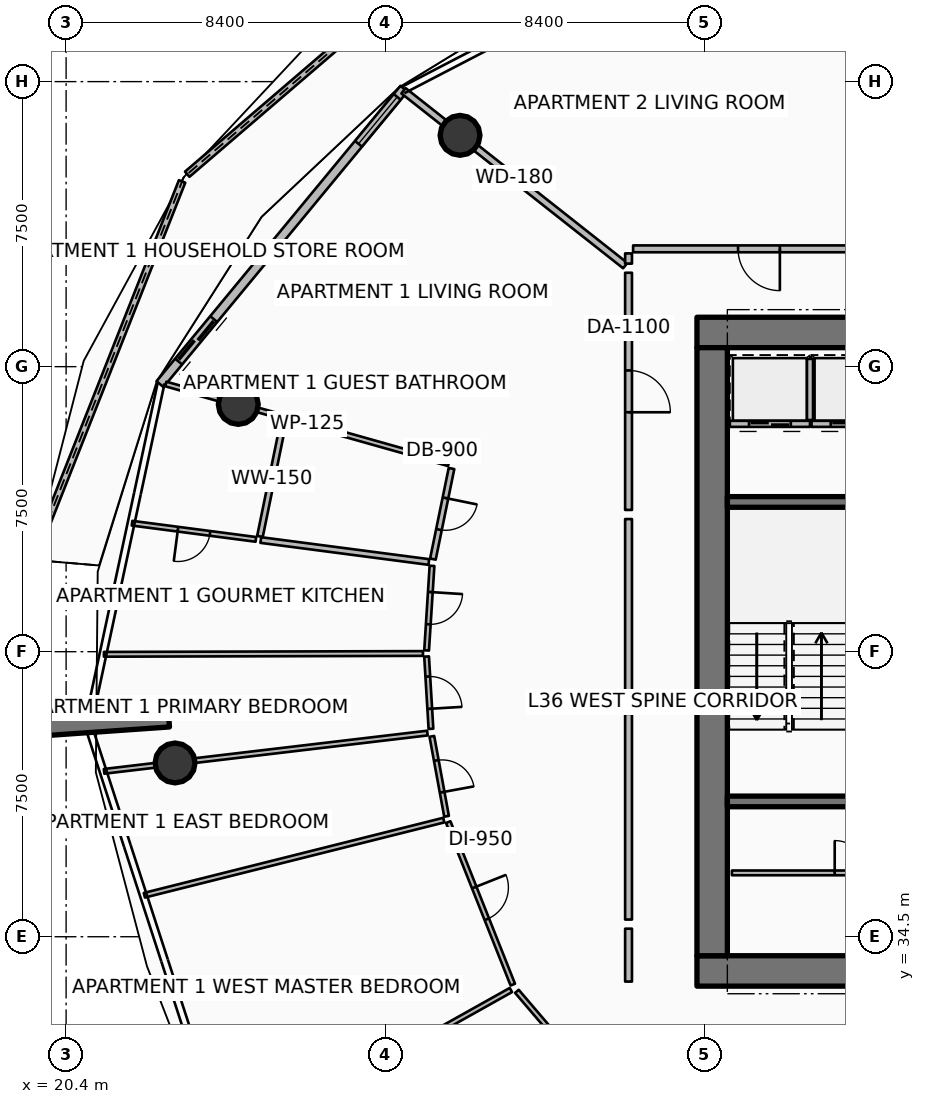
"""IFC4 building model, lengths in metres.
Left out: names, types, materials, properties, quantities, classifications, styles, units other than length and angle.
Written with IfcOpenShell. Run it as: python <this file> out.ifc"""

import sys

from ifc_helpers import new_model, si_unit, direction, frame, frame_2d, origin, origin_2d, place, context, subcontext, project, spatial, polyline, rectangle, circle, outline, extrude, element, fill, save


model = new_model("IFC4")
c1 = context("Model", 3, precision=1e-05, world=origin(), true_north=direction((0.0, 1.0)))
c2 = subcontext(c1, "Body", "Model", "MODEL_VIEW")
j1 = project(units=[si_unit("LENGTHUNIT", "METRE"), si_unit("PLANEANGLEUNIT", "RADIAN")], contexts=[c1])
p1 = place(None, origin())
s1 = spatial("IfcSite", under=j1, at=p1, CompositionType="ELEMENT")
p2 = place(p1, origin())
s2 = spatial("IfcBuilding", under=s1, at=p2, CompositionType="ELEMENT")
p3 = place(p2, frame((0.0, 0.0, 146.55)))
s3 = spatial("IfcBuildingStorey", under=s2, at=p3, CompositionType="ELEMENT", Elevation=146.55)
for number, where, z_axis, x_axis in (
    (1, (37.0, 33.6, 0.0), (0.0, 0.0, 1.0), (1.0, 0.0, 0.0)),
    (2, (37.0, 50.4, 0.0), (0.0, 0.0, 1.0), (1.0, 0.0, 0.0)),
):
    element("IfcWall", number, at=place(p3, frame(where, z_axis=z_axis, x_axis=x_axis)), inside=s3, PredefinedType="SHEAR", context=c2, shape_type="SweptSolid", body=[
        extrude(rectangle(XDim=9.9, YDim=0.8, at=frame_2d((4.95, 0.0))), origin(), (0.0, 0.0, 1.0), 3.75),
    ])
p4 = place(p3, frame((37.4, 34.0, 0.0), z_axis=(0.0, 0.0, 1.0), x_axis=(0.0, 1.0, 0.0)))
e3 = element("IfcWall", 3, at=p4, inside=s3, PredefinedType="SHEAR", context=c2, shape_type="SweptSolid", body=[
    extrude(rectangle(XDim=16.0, YDim=0.8, at=frame_2d((8.0, 0.0))), origin(), (0.0, 0.0, 1.0), 3.75),
])
for number, where, z_axis, x_axis in (
    (4, (37.8, 38.06, 0.0), (0.0, 0.0, 1.0), (1.0, 0.0, 0.0)),
    (5, (37.8, 45.94, 0.0), (0.0, 0.0, 1.0), (1.0, 0.0, 0.0)),
):
    element("IfcWall", number, at=place(p3, frame(where, z_axis=z_axis, x_axis=x_axis)), inside=s3, PredefinedType="SHEAR", context=c2, shape_type="SweptSolid", body=[
        extrude(rectangle(XDim=3.5, YDim=0.28, at=frame_2d((1.75, 0.0))), origin(), (0.0, 0.0, 1.0), 3.75),
    ])
p5 = place(p3, frame((23.103, 40.259, 0.0), z_axis=(0.0, 0.0, 1.0), x_axis=(-0.997564163539, -0.069754853754, 0.0)))
e6 = element("IfcWall", 6, at=p5, inside=s3, PredefinedType="SOLIDWALL", context=c2, shape_type="SweptSolid", body=[
    extrude(rectangle(XDim=3.5, YDim=0.48, at=frame_2d((1.75, 0.0))), origin(), (0.0, 0.0, 1.0), 3.75),
])
for number, where, z_axis, x_axis in (
    (7, (30.766, 55.586, 0.0), (0.0, 0.0, 1.0), (1.0, 0.0, 0.0)),
    (8, (24.93, 48.506, 0.0), (0.0, 0.0, 1.0), (1.0, 0.0, 0.0)),
    (9, (23.267, 39.073, 0.0), (0.0, 0.0, 1.0), (1.0, 0.0, 0.0)),
):
    element("IfcColumn", number, at=place(p3, frame(where, z_axis=z_axis, x_axis=x_axis)), inside=s3, PredefinedType="COLUMN", context=c2, shape_type="SweptSolid", body=[
        extrude(circle(Radius=0.525, at=origin_2d()), origin(), (0.0, 0.0, 1.0), 3.5),
    ])
p6 = place(p3, frame((31.366, 61.237, 0.0), z_axis=(0.0, 0.0, 1.0), x_axis=(-0.758999279374, -0.651091463551, 0.0)))
e10 = element("IfcWall", 10, at=p6, inside=s3, PredefinedType="PARAPET", context=c2, shape_type="SweptSolid", body=[
    extrude(outline(polyline([(0.0, 0.0), (10.249, 0.0), (10.249, 1.632), (5.125, 1.798), (0.0, 1.86), (0.0, 0.0)])), frame((0.0, 0.09, 0.0), z_axis=(0.0, -1.0, 0.0), x_axis=(1.0, 0.0, 0.0)), (0.0, 0.0, 1.0), 0.18),
])
p7 = place(p3, frame((23.452, 54.374, 0.0), z_axis=(0.0, 0.0, 1.0), x_axis=(-0.367668520181, -0.929956912587, 0.0)))
e11 = element("IfcWall", 11, at=p7, inside=s3, PredefinedType="PARAPET", context=c2, shape_type="SweptSolid", body=[
    extrude(outline(polyline([(0.0, 0.0), (10.707, 0.0), (10.707, 1.233), (5.354, 1.418), (0.0, 1.632), (0.0, 0.0)])), frame((0.0, 0.09, 0.0), z_axis=(0.0, -1.0, 0.0), x_axis=(1.0, 0.0, 0.0)), (0.0, 0.0, 1.0), 0.18),
])
p8 = place(p3, frame((29.291, 56.813, 0.0), z_axis=(0.0, 0.0, 1.0), x_axis=(-0.636771922292, -0.77105221547, 0.0)))
e12 = element("IfcWall", 12, at=p8, inside=s3, PredefinedType="SOLIDWALL", context=c2, shape_type="SweptSolid", body=[
    extrude(rectangle(XDim=10.082, YDim=0.24, at=frame_2d((5.041, 0.0))), origin(), (0.0, 0.0, 1.0), 2.45),
])
p9 = place(p8, frame((7.862, 0.0, 0.0)))
e13 = element("IfcOpeningElement", 13, at=p9, cuts=e12, PredefinedType="OPENING", context=c2, shape_type="SweptSolid", body=[
    extrude(rectangle(XDim=1.45, YDim=2.15, at=frame_2d((0.725, 1.075))), frame((0.0, 0.13, 0.0), z_axis=(0.0, -1.0, 0.0), x_axis=(1.0, 0.0, 0.0)), (0.0, 0.0, 1.0), 0.26),
])
p10 = place(p8, frame((0.28, 0.0, 0.65)))
e14 = element("IfcOpeningElement", 14, at=p10, cuts=e12, PredefinedType="OPENING", context=c2, shape_type="SweptSolid", body=[
    extrude(rectangle(XDim=1.6, YDim=1.5, at=frame_2d((0.8, 0.75))), frame((0.0, 0.13, 0.0), z_axis=(0.0, -1.0, 0.0), x_axis=(1.0, 0.0, 0.0)), (0.0, 0.0, 1.0), 0.26),
])
p11 = place(p3, frame((39.975, 47.995, 0.0), z_axis=(0.0, 0.0, 1.0), x_axis=(-1.0, 0.0, 0.0)))
e15 = element("IfcWall", 15, at=p11, inside=s3, PredefinedType="PARTITIONING", context=c2, shape_type="SweptSolid", body=[
    extrude(rectangle(XDim=2.11, YDim=0.16, at=frame_2d((1.055, 0.0))), origin(), (0.0, 0.0, 1.0), 3.5),
])
p12 = place(p11, frame((0.505, 0.0, 0.0)))
e16 = element("IfcOpeningElement", 16, at=p12, cuts=e15, PredefinedType="OPENING", context=c2, shape_type="SweptSolid", body=[
    extrude(rectangle(XDim=1.1, YDim=2.1, at=frame_2d((0.55, 1.05))), frame((0.0, 0.09, 0.0), z_axis=(0.0, -1.0, 0.0), x_axis=(1.0, 0.0, 0.0)), (0.0, 0.0, 1.0), 0.18),
])
p13 = place(p3, frame((39.975, 48.095, 0.0), z_axis=(0.0, 0.0, 1.0), x_axis=(0.0, 1.0, 0.0)))
e17 = element("IfcWall", 17, at=p13, inside=s3, PredefinedType="PARTITIONING", context=c2, shape_type="SweptSolid", body=[
    extrude(rectangle(XDim=1.61, YDim=0.16, at=frame_2d((0.805, 0.0))), origin(), (0.0, 0.0, 1.0), 3.5),
])
p14 = place(p3, frame((42.125, 47.995, 0.0), z_axis=(0.0, 0.0, 1.0), x_axis=(-1.0, 0.0, 0.0)))
e18 = element("IfcWall", 18, at=p14, inside=s3, PredefinedType="PARTITIONING", context=c2, shape_type="SweptSolid", body=[
    extrude(rectangle(XDim=2.11, YDim=0.16, at=frame_2d((1.055, 0.0))), origin(), (0.0, 0.0, 1.0), 3.5),
])
p15 = place(p14, frame((0.505, 0.0, 0.0)))
e19 = element("IfcOpeningElement", 19, at=p15, cuts=e18, PredefinedType="OPENING", context=c2, shape_type="SweptSolid", body=[
    extrude(rectangle(XDim=1.1, YDim=2.1, at=frame_2d((0.55, 1.05))), frame((0.0, 0.09, 0.0), z_axis=(0.0, -1.0, 0.0), x_axis=(1.0, 0.0, 0.0)), (0.0, 0.0, 1.0), 0.18),
])
p16 = place(p3, frame((37.92, 36.18, 0.0), z_axis=(0.0, 0.0, 1.0), x_axis=(1.0, 0.0, 0.0)))
e20 = element("IfcWall", 20, at=p16, inside=s3, PredefinedType="PARTITIONING", context=c2, shape_type="SweptSolid", body=[
    extrude(rectangle(XDim=6.26, YDim=0.125, at=frame_2d((3.13, 0.0))), origin(), (0.0, 0.0, 1.0), 2.94),
])
p17 = place(p16, frame((2.705, 0.0, 0.0)))
e21 = element("IfcOpeningElement", 21, at=p17, cuts=e20, PredefinedType="OPENING", context=c2, shape_type="SweptSolid", body=[
    extrude(rectangle(XDim=0.85, YDim=2.06, at=frame_2d((0.425, 1.03))), frame((0.0, 0.073, 0.0), z_axis=(0.0, -1.0, 0.0), x_axis=(1.0, 0.0, 0.0)), (0.0, 0.0, 1.0), 0.145),
])
p18 = place(p3, frame((35.114, 52.159, 0.0), z_axis=(0.0, 0.0, 1.0), x_axis=(-0.78531739611, 0.619093359169, 0.0)))
e22 = element("IfcWall", 22, at=p18, inside=s3, PredefinedType="PARTITIONING", context=c2, shape_type="SweptSolid", body=[
    extrude(rectangle(XDim=7.43, YDim=0.18, at=frame_2d((3.715, 0.0))), origin(), (0.0, 0.0, 1.0), 2.94),
])
p19 = place(p3, frame((35.2, 51.971, 0.0), z_axis=(0.0, 0.0, 1.0), x_axis=(0.0, -1.0, 0.0)))
e23 = element("IfcWall", 23, at=p19, inside=s3, PredefinedType="PARTITIONING", context=c2, shape_type="SweptSolid", body=[
    extrude(rectangle(XDim=6.241, YDim=0.18, at=frame_2d((3.12, 0.0))), origin(), (0.0, 0.0, 1.0), 2.94),
])
p20 = place(p19, frame((2.57, 0.0, 0.0)))
e24 = element("IfcOpeningElement", 24, at=p20, cuts=e23, PredefinedType="OPENING", context=c2, shape_type="SweptSolid", body=[
    extrude(rectangle(XDim=1.1, YDim=2.1, at=frame_2d((0.55, 1.05))), frame((0.0, 0.1, 0.0), z_axis=(0.0, -1.0, 0.0), x_axis=(1.0, 0.0, 0.0)), (0.0, 0.0, 1.0), 0.2),
])
p21 = place(p3, frame((35.2, 45.49, 0.0), z_axis=(0.0, 0.0, 1.0), x_axis=(0.0, -1.0, 0.0)))
e25 = element("IfcWall", 25, at=p21, inside=s3, PredefinedType="PARTITIONING", context=c2, shape_type="SweptSolid", body=[
    extrude(rectangle(XDim=4.885, YDim=0.18, at=frame_2d((2.442, 0.0))), origin(), (0.0, 0.0, 1.0), 2.94),
])
p22 = place(p3, frame((30.465, 46.945, 0.0), z_axis=(0.0, 0.0, 1.0), x_axis=(-0.962456021196, 0.271437667363, 0.0)))
e26 = element("IfcWall", 26, at=p22, inside=s3, PredefinedType="PARTITIONING", context=c2, shape_type="SweptSolid", body=[
    extrude(rectangle(XDim=7.732, YDim=0.125, at=frame_2d((3.866, 0.0))), origin(), (0.0, 0.0, 1.0), 2.94),
])
p23 = place(p3, frame((30.541, 46.82, 0.0), z_axis=(0.0, 0.0, 1.0), x_axis=(-0.201072520907, -0.979576358094, 0.0)))
e27 = element("IfcWall", 27, at=p23, inside=s3, PredefinedType="PARTITIONING", context=c2, shape_type="SweptSolid", body=[
    extrude(rectangle(XDim=2.433, YDim=0.15, at=frame_2d((1.217, 0.0))), origin(), (0.0, 0.0, 1.0), 2.94),
])
p24 = place(p23, frame((0.792, 0.0, 0.0)))
e28 = element("IfcOpeningElement", 28, at=p24, cuts=e27, PredefinedType="OPENING", context=c2, shape_type="SweptSolid", body=[
    extrude(rectangle(XDim=0.85, YDim=2.06, at=frame_2d((0.425, 1.03))), frame((0.0, 0.085, 0.0), z_axis=(0.0, -1.0, 0.0), x_axis=(1.0, 0.0, 0.0)), (0.0, 0.0, 1.0), 0.17),
])
p25 = place(p3, frame((26.124, 48.066, 0.0), z_axis=(0.0, 0.0, 1.0), x_axis=(-0.201054681034, -0.979580019822, 0.0)))
e29 = element("IfcWall", 29, at=p25, inside=s3, PredefinedType="PARTITIONING", context=c2, shape_type="SweptSolid", body=[
    extrude(rectangle(XDim=3.098, YDim=0.15, at=frame_2d((1.549, 0.0))), origin(), (0.0, 0.0, 1.0), 2.94),
])
p26 = place(p3, frame((29.945, 44.36, 0.0), z_axis=(0.0, 0.0, 1.0), x_axis=(-0.991563130501, 0.129624682181, 0.0)))
e30 = element("IfcWall", 30, at=p26, inside=s3, PredefinedType="PARTITIONING", context=c2, shape_type="SweptSolid", body=[
    extrude(rectangle(XDim=4.46, YDim=0.15, at=frame_2d((2.23, 0.0))), origin(), (0.0, 0.0, 1.0), 2.94),
])
p27 = place(p3, frame((25.393, 44.955, 0.0), z_axis=(0.0, 0.0, 1.0), x_axis=(-0.991560176963, 0.12964727325, 0.0)))
e31 = element("IfcWall", 31, at=p27, inside=s3, PredefinedType="PARTITIONING", context=c2, shape_type="SweptSolid", body=[
    extrude(rectangle(XDim=3.286, YDim=0.125, at=frame_2d((1.643, 0.0))), origin(), (0.0, 0.0, 1.0), 2.94),
])
p28 = place(p27, frame((1.218, 0.0, 0.0)))
e32 = element("IfcOpeningElement", 32, at=p28, cuts=e31, PredefinedType="OPENING", context=c2, shape_type="SweptSolid", body=[
    extrude(rectangle(XDim=0.85, YDim=2.06, at=frame_2d((0.425, 1.03))), frame((0.0, 0.073, 0.0), z_axis=(0.0, -1.0, 0.0), x_axis=(1.0, 0.0, 0.0)), (0.0, 0.0, 1.0), 0.145),
])
p29 = place(p3, frame((29.791, 41.953, 0.0), z_axis=(0.0, 0.0, 1.0), x_axis=(-0.999996651439, -0.0025878777, 0.0)))
e33 = element("IfcWall", 33, at=p29, inside=s3, PredefinedType="PARTITIONING", context=c2, shape_type="SweptSolid", body=[
    extrude(rectangle(XDim=8.396, YDim=0.125, at=frame_2d((4.198, 0.0))), origin(), (0.0, 0.0, 1.0), 2.94),
])
p30 = place(p3, frame((30.028, 44.259, 0.0), z_axis=(0.0, 0.0, 1.0), x_axis=(-0.063707112834, -0.997968638673, 0.0)))
e34 = element("IfcWall", 34, at=p30, inside=s3, PredefinedType="PARTITIONING", context=c2, shape_type="SweptSolid", body=[
    extrude(rectangle(XDim=2.23, YDim=0.125, at=frame_2d((1.115, 0.0))), origin(), (0.0, 0.0, 1.0), 2.94),
])
p31 = place(p30, frame((0.69, 0.0, 0.0)))
e35 = element("IfcOpeningElement", 35, at=p31, cuts=e34, PredefinedType="OPENING", context=c2, shape_type="SweptSolid", body=[
    extrude(rectangle(XDim=0.85, YDim=2.06, at=frame_2d((0.425, 1.03))), frame((0.0, 0.073, 0.0), z_axis=(0.0, -1.0, 0.0), x_axis=(1.0, 0.0, 0.0)), (0.0, 0.0, 1.0), 0.145),
])
p32 = place(p3, frame((29.886, 41.873, 0.0), z_axis=(0.0, 0.0, 1.0), x_axis=(0.060058165276, -0.998194879161, 0.0)))
e36 = element("IfcWall", 36, at=p32, inside=s3, PredefinedType="PARTITIONING", context=c2, shape_type="SweptSolid", body=[
    extrude(rectangle(XDim=1.906, YDim=0.125, at=frame_2d((0.953, 0.0))), origin(), (0.0, 0.0, 1.0), 2.94),
])
p33 = place(p32, frame((0.528, 0.0, 0.0)))
e37 = element("IfcOpeningElement", 37, at=p33, cuts=e36, PredefinedType="OPENING", context=c2, shape_type="SweptSolid", body=[
    extrude(rectangle(XDim=0.85, YDim=2.06, at=frame_2d((0.425, 1.03))), frame((0.0, 0.073, 0.0), z_axis=(0.0, -1.0, 0.0), x_axis=(1.0, 0.0, 0.0)), (0.0, 0.0, 1.0), 0.145),
])
p34 = place(p3, frame((35.2, 40.365, 0.0), z_axis=(0.0, 0.0, 1.0), x_axis=(0.0, -1.0, 0.0)))
e38 = element("IfcWall", 38, at=p34, inside=s3, PredefinedType="PARTITIONING", context=c2, shape_type="SweptSolid", body=[
    extrude(rectangle(XDim=5.413, YDim=0.18, at=frame_2d((2.707, 0.0))), origin(), (0.0, 0.0, 1.0), 2.94),
])
p35 = place(p3, frame((29.907, 39.858, 0.0), z_axis=(0.0, 0.0, 1.0), x_axis=(-0.993070228419, -0.117522429465, 0.0)))
e39 = element("IfcWall", 39, at=p35, inside=s3, PredefinedType="PARTITIONING", context=c2, shape_type="SweptSolid", body=[
    extrude(rectangle(XDim=8.567, YDim=0.125, at=frame_2d((4.284, 0.0))), origin(), (0.0, 0.0, 1.0), 2.94),
])
p36 = place(p3, frame((30.338, 37.569, 0.0), z_axis=(0.0, 0.0, 1.0), x_axis=(-0.969940631235, -0.243341677236, 0.0)))
e40 = element("IfcWall", 40, at=p36, inside=s3, PredefinedType="PARTITIONING", context=c2, shape_type="SweptSolid", body=[
    extrude(rectangle(XDim=8.124, YDim=0.125, at=frame_2d((4.062, 0.0))), origin(), (0.0, 0.0, 1.0), 2.94),
])
p37 = place(p3, frame((30.025, 39.772, 0.0), z_axis=(0.0, 0.0, 1.0), x_axis=(0.180764237825, -0.983526456341, 0.0)))
e41 = element("IfcWall", 41, at=p37, inside=s3, PredefinedType="PARTITIONING", context=c2, shape_type="SweptSolid", body=[
    extrude(rectangle(XDim=2.138, YDim=0.125, at=frame_2d((1.069, 0.0))), origin(), (0.0, 0.0, 1.0), 2.94),
])
p38 = place(p37, frame((0.644, 0.0, 0.0)))
e42 = element("IfcOpeningElement", 42, at=p38, cuts=e41, PredefinedType="OPENING", context=c2, shape_type="SweptSolid", body=[
    extrude(rectangle(XDim=0.85, YDim=2.06, at=frame_2d((0.425, 1.03))), frame((0.0, 0.073, 0.0), z_axis=(0.0, -1.0, 0.0), x_axis=(1.0, 0.0, 0.0)), (0.0, 0.0, 1.0), 0.145),
])
p39 = place(p3, frame((30.455, 37.516, 0.0), z_axis=(0.0, 0.0, 1.0), x_axis=(0.369249273076, -0.929330390299, 0.0)))
e43 = element("IfcWall", 43, at=p39, inside=s3, PredefinedType="PARTITIONING", context=c2, shape_type="SweptSolid", body=[
    extrude(rectangle(XDim=4.602, YDim=0.125, at=frame_2d((2.301, 0.0))), origin(), (0.0, 0.0, 1.0), 2.94),
])
p40 = place(p39, frame((1.851, 0.0, 0.0)))
e44 = element("IfcOpeningElement", 44, at=p40, cuts=e43, PredefinedType="OPENING", context=c2, shape_type="SweptSolid", body=[
    extrude(rectangle(XDim=0.9, YDim=2.08, at=frame_2d((0.45, 1.04))), frame((0.0, 0.073, 0.0), z_axis=(0.0, -1.0, 0.0), x_axis=(1.0, 0.0, 0.0)), (0.0, 0.0, 1.0), 0.145),
])
p41 = place(p3, frame((35.2, 34.712, 0.0), z_axis=(0.0, 0.0, 1.0), x_axis=(0.0, -1.0, 0.0)))
e45 = element("IfcWall", 45, at=p41, inside=s3, PredefinedType="PARTITIONING", context=c2, shape_type="SweptSolid", body=[
    extrude(rectangle(XDim=1.392, YDim=0.18, at=frame_2d((0.696, 0.0))), origin(), (0.0, 0.0, 1.0), 2.94),
])
p42 = place(p3, frame((32.104, 33.098, 0.0), z_axis=(0.0, 0.0, 1.0), x_axis=(-0.872488035617, -0.488635475283, 0.0)))
e46 = element("IfcWall", 46, at=p42, inside=s3, PredefinedType="PARTITIONING", context=c2, shape_type="SweptSolid", body=[
    extrude(rectangle(XDim=8.567, YDim=0.125, at=frame_2d((4.284, 0.0))), origin(), (0.0, 0.0, 1.0), 2.94),
])
p43 = place(p3, frame((32.263, 33.063, 0.0), z_axis=(0.0, 0.0, 1.0), x_axis=(0.649448927448, -0.760405214762, 0.0)))
e47 = element("IfcWall", 47, at=p43, inside=s3, PredefinedType="PARTITIONING", context=c2, shape_type="SweptSolid", body=[
    extrude(rectangle(XDim=6.85, YDim=0.125, at=frame_2d((3.425, 0.0))), origin(), (0.0, 0.0, 1.0), 2.94),
])
p44 = place(p43, frame((2.975, 0.0, 0.0)))
e48 = element("IfcOpeningElement", 48, at=p44, cuts=e47, PredefinedType="OPENING", context=c2, shape_type="SweptSolid", body=[
    extrude(rectangle(XDim=0.9, YDim=2.08, at=frame_2d((0.45, 1.04))), frame((0.0, 0.073, 0.0), z_axis=(0.0, -1.0, 0.0), x_axis=(1.0, 0.0, 0.0)), (0.0, 0.0, 1.0), 0.145),
])
p45 = place(p3, frame((41.944, 52.6, 0.0), z_axis=(0.0, 0.0, 1.0), x_axis=(-1.0, 0.0, 0.0)))
e49 = element("IfcWall", 49, at=p45, inside=s3, PredefinedType="PARTITIONING", context=c2, shape_type="SweptSolid", body=[
    extrude(rectangle(XDim=6.624, YDim=0.18, at=frame_2d((3.312, 0.0))), origin(), (0.0, 0.0, 1.0), 2.94),
])
p46 = place(p45, frame((2.762, 0.0, 0.0)))
e50 = element("IfcOpeningElement", 50, at=p46, cuts=e49, PredefinedType="OPENING", context=c2, shape_type="SweptSolid", body=[
    extrude(rectangle(XDim=1.1, YDim=2.1, at=frame_2d((0.55, 1.05))), frame((0.0, 0.1, 0.0), z_axis=(0.0, -1.0, 0.0), x_axis=(1.0, 0.0, 0.0)), (0.0, 0.0, 1.0), 0.2),
])
p47 = place(p3, frame((35.2, 52.48, 0.0), z_axis=(0.0, 0.0, 1.0), x_axis=(0.0, -1.0, 0.0)))
e51 = element("IfcWall", 51, at=p47, inside=s3, PredefinedType="PARTITIONING", context=c2, shape_type="SweptSolid", body=[
    extrude(rectangle(XDim=0.269, YDim=0.18, at=frame_2d((0.135, 0.0))), origin(), (0.0, 0.0, 1.0), 2.94),
])
p48 = place(p9, origin())
e52 = element("IfcDoor", 52, at=p48, inside=s3, OperationType="DOUBLE_DOOR_SLIDING", PredefinedType="DOOR", context=c2, shape_type="SweptSolid", body=[
    extrude(rectangle(XDim=1.45, YDim=2.15, at=frame_2d((0.725, 1.075))), frame((0.0, 0.025, 0.0), z_axis=(0.0, -1.0, 0.0), x_axis=(1.0, 0.0, 0.0)), (0.0, 0.0, 1.0), 0.05),
])
fill(e13, e52)
p49 = place(p10, origin())
e53 = element("IfcWindow", 53, at=p49, inside=s3, PartitioningType="SINGLE_PANEL", PredefinedType="WINDOW", context=c2, shape_type="SweptSolid", body=[
    extrude(rectangle(XDim=1.6, YDim=1.5, at=frame_2d((0.8, 0.75))), frame((0.0, 0.03, 0.0), z_axis=(0.0, -1.0, 0.0), x_axis=(1.0, 0.0, 0.0)), (0.0, 0.0, 1.0), 0.06),
])
fill(e14, e53)
p50 = place(p12, origin())
e54 = element("IfcDoor", 54, at=p50, inside=s3, OperationType="DOUBLE_DOOR_SLIDING", PredefinedType="DOOR", context=c2, shape_type="SweptSolid", body=[
    extrude(rectangle(XDim=1.1, YDim=2.1, at=frame_2d((0.55, 1.05))), frame((0.0, 0.025, 0.0), z_axis=(0.0, -1.0, 0.0), x_axis=(1.0, 0.0, 0.0)), (0.0, 0.0, 1.0), 0.05),
])
fill(e16, e54)
p51 = place(p15, origin())
e55 = element("IfcDoor", 55, at=p51, inside=s3, OperationType="DOUBLE_DOOR_SLIDING", PredefinedType="DOOR", context=c2, shape_type="SweptSolid", body=[
    extrude(rectangle(XDim=1.1, YDim=2.1, at=frame_2d((0.55, 1.05))), frame((0.0, 0.025, 0.0), z_axis=(0.0, -1.0, 0.0), x_axis=(1.0, 0.0, 0.0)), (0.0, 0.0, 1.0), 0.05),
])
fill(e19, e55)
p52 = place(p17, origin())
e56 = element("IfcDoor", 56, at=p52, inside=s3, OperationType="SINGLE_SWING_LEFT", PredefinedType="DOOR", context=c2, shape_type="SweptSolid", body=[
    extrude(rectangle(XDim=0.85, YDim=2.06, at=frame_2d((0.425, 1.03))), frame((0.0, 0.025, 0.0), z_axis=(0.0, -1.0, 0.0), x_axis=(1.0, 0.0, 0.0)), (0.0, 0.0, 1.0), 0.05),
])
fill(e21, e56)
p53 = place(p20, origin())
e57 = element("IfcDoor", 57, at=p53, inside=s3, OperationType="SINGLE_SWING_RIGHT", PredefinedType="DOOR", context=c2, shape_type="SweptSolid", body=[
    extrude(rectangle(XDim=1.1, YDim=2.1, at=frame_2d((0.55, 1.05))), frame((0.0, 0.025, 0.0), z_axis=(0.0, -1.0, 0.0), x_axis=(1.0, 0.0, 0.0)), (0.0, 0.0, 1.0), 0.05),
])
fill(e24, e57)
p54 = place(p24, origin())
e58 = element("IfcDoor", 58, at=p54, inside=s3, OperationType="SINGLE_SWING_LEFT", PredefinedType="DOOR", context=c2, shape_type="SweptSolid", body=[
    extrude(rectangle(XDim=0.85, YDim=2.06, at=frame_2d((0.425, 1.03))), frame((0.0, 0.025, 0.0), z_axis=(0.0, -1.0, 0.0), x_axis=(1.0, 0.0, 0.0)), (0.0, 0.0, 1.0), 0.05),
])
fill(e28, e58)
p55 = place(p28, origin())
e59 = element("IfcDoor", 59, at=p55, inside=s3, OperationType="SINGLE_SWING_RIGHT", PredefinedType="DOOR", context=c2, shape_type="SweptSolid", body=[
    extrude(rectangle(XDim=0.85, YDim=2.06, at=frame_2d((0.425, 1.03))), frame((0.0, 0.025, 0.0), z_axis=(0.0, -1.0, 0.0), x_axis=(1.0, 0.0, 0.0)), (0.0, 0.0, 1.0), 0.05),
])
fill(e32, e59)
p56 = place(p31, origin())
e60 = element("IfcDoor", 60, at=p56, inside=s3, OperationType="SINGLE_SWING_LEFT", PredefinedType="DOOR", context=c2, shape_type="SweptSolid", body=[
    extrude(rectangle(XDim=0.85, YDim=2.06, at=frame_2d((0.425, 1.03))), frame((0.0, 0.025, 0.0), z_axis=(0.0, -1.0, 0.0), x_axis=(1.0, 0.0, 0.0)), (0.0, 0.0, 1.0), 0.05),
])
fill(e35, e60)
p57 = place(p33, origin())
e61 = element("IfcDoor", 61, at=p57, inside=s3, OperationType="SINGLE_SWING_RIGHT", PredefinedType="DOOR", context=c2, shape_type="SweptSolid", body=[
    extrude(rectangle(XDim=0.85, YDim=2.06, at=frame_2d((0.425, 1.03))), frame((0.0, 0.025, 0.0), z_axis=(0.0, -1.0, 0.0), x_axis=(1.0, 0.0, 0.0)), (0.0, 0.0, 1.0), 0.05),
])
fill(e37, e61)
p58 = place(p38, origin())
e62 = element("IfcDoor", 62, at=p58, inside=s3, OperationType="SINGLE_SWING_RIGHT", PredefinedType="DOOR", context=c2, shape_type="SweptSolid", body=[
    extrude(rectangle(XDim=0.85, YDim=2.06, at=frame_2d((0.425, 1.03))), frame((0.0, 0.025, 0.0), z_axis=(0.0, -1.0, 0.0), x_axis=(1.0, 0.0, 0.0)), (0.0, 0.0, 1.0), 0.05),
])
fill(e42, e62)
p59 = place(p40, origin())
e63 = element("IfcDoor", 63, at=p59, inside=s3, OperationType="SINGLE_SWING_LEFT", PredefinedType="DOOR", context=c2, shape_type="SweptSolid", body=[
    extrude(rectangle(XDim=0.9, YDim=2.08, at=frame_2d((0.45, 1.04))), frame((0.0, 0.025, 0.0), z_axis=(0.0, -1.0, 0.0), x_axis=(1.0, 0.0, 0.0)), (0.0, 0.0, 1.0), 0.05),
])
fill(e44, e63)
p60 = place(p46, origin())
e64 = element("IfcDoor", 64, at=p60, inside=s3, OperationType="SINGLE_SWING_LEFT", PredefinedType="DOOR", context=c2, shape_type="SweptSolid", body=[
    extrude(rectangle(XDim=1.1, YDim=2.1, at=frame_2d((0.55, 1.05))), frame((0.0, 0.025, 0.0), z_axis=(0.0, -1.0, 0.0), x_axis=(1.0, 0.0, 0.0)), (0.0, 0.0, 1.0), 0.05),
])
fill(e50, e64)
save(model, sys.argv[1])
